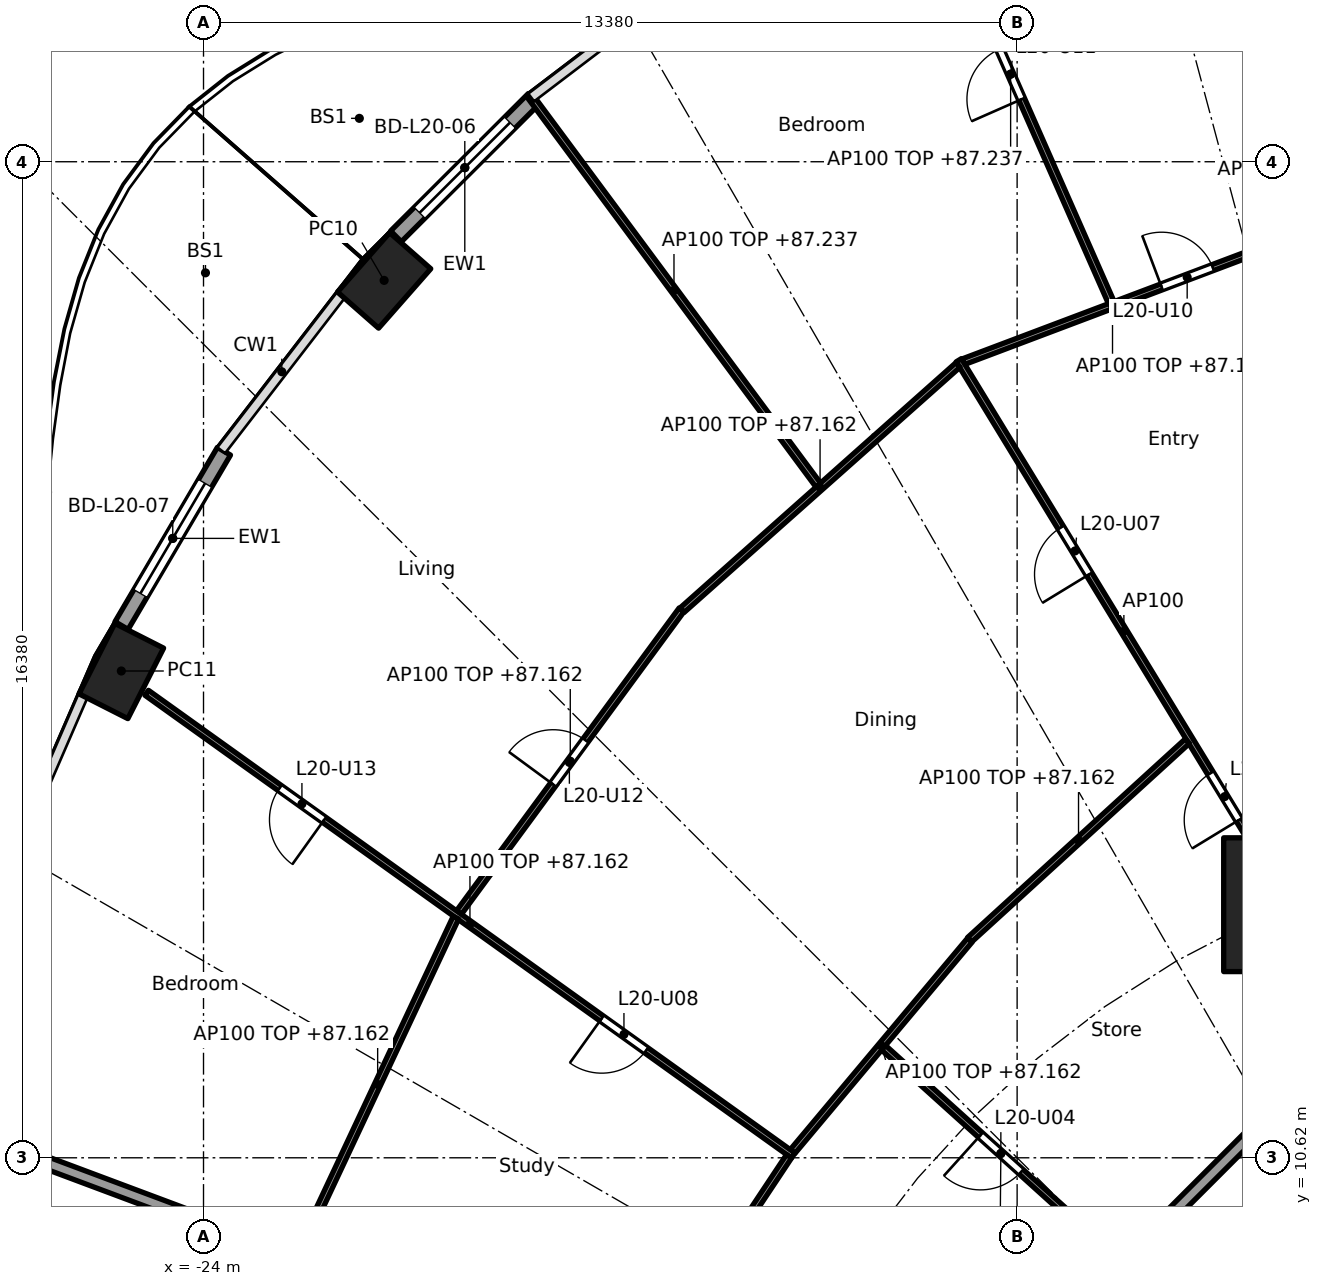
"""IFC4 building model, lengths in metres.
Left out: names, types, materials, properties, quantities, classifications, styles, units other than length and angle.
Written with IfcOpenShell. Run it as: python <this file> out.ifc"""

import sys

from ifc_helpers import new_model, si_unit, direction, frame, frame_2d, origin, origin_2d, place, context, subcontext, project, spatial, rectangle, hollow_rectangle, extrude, element, fill, save


model = new_model("IFC4")
c1 = context("Model", 3, precision=1e-05, world=origin(), true_north=direction((0.0, 1.0)))
c2 = subcontext(c1, "Body", "Model", "MODEL_VIEW")
j1 = project(units=[si_unit("LENGTHUNIT", "METRE"), si_unit("PLANEANGLEUNIT", "RADIAN")], contexts=[c1])
p1 = place(None, origin())
s1 = spatial("IfcSite", under=j1, at=p1, CompositionType="ELEMENT")
p2 = place(p1, origin())
s2 = spatial("IfcBuilding", under=s1, at=p2, CompositionType="ELEMENT")
p3 = place(p2, frame((0.0, 0.0, 84.4)))
s3 = spatial("IfcBuildingStorey", under=s2, at=p3, CompositionType="ELEMENT", Elevation=84.4)
for number, where, z_axis, x_axis in (
    (1, (-21.03, 25.049, 0.0), (0.0, 0.0, 1.0), (-0.66, -0.751, 0.0)),
    (2, (-25.352, 18.625, 0.0), (0.0, 0.0, 1.0), (-0.452, -0.892, 0.0)),
):
    element("IfcColumn", number, at=place(p3, frame(where, z_axis=z_axis, x_axis=x_axis)), inside=s3, PredefinedType="COLUMN", context=c2, shape_type="SweptSolid", body=[
        extrude(hollow_rectangle(XDim=1.3, YDim=0.9, WallThickness=0.045, at=origin_2d()), origin(), (0.0, 0.0, 1.0), 3.7),
    ])
p4 = place(p3, frame((-6.123, 14.782, 0.0), z_axis=(0.0, 0.0, 1.0), x_axis=(1.0, 0.0, 0.0)))
e3 = element("IfcColumn", 3, at=p4, inside=s3, PredefinedType="COLUMN", context=c2, shape_type="SweptSolid", body=[
    extrude(rectangle(XDim=2.2, YDim=2.2, at=origin_2d()), origin(), (0.0, 0.0, 1.0), 3.7),
])
p5 = place(p3, frame((-20.835, 25.773, 0.0), z_axis=(0.0, 0.0, 1.0), x_axis=(0.707831646613, 0.706381171927, 0.0)))
e4 = element("IfcWall", 4, at=p5, inside=s3, PredefinedType="SOLIDWALL", context=c2, shape_type="SweptSolid", body=[
    extrude(rectangle(XDim=3.198, YDim=0.25, at=frame_2d((1.599, 0.0))), origin(), (0.0, 0.0, 1.0), 3.44),
])
p6 = place(p5, frame((0.549, 0.0, 0.0)))
e5 = element("IfcOpeningElement", 5, at=p6, cuts=e4, PredefinedType="OPENING", context=c2, shape_type="SweptSolid", body=[
    extrude(rectangle(XDim=2.1, YDim=2.4, at=frame_2d((1.05, 1.2))), frame((0.0, 0.135, 0.0), z_axis=(0.0, -1.0, 0.0), x_axis=(1.0, 0.0, 0.0)), (0.0, 0.0, 1.0), 0.27),
])
p7 = place(p3, frame((-25.348, 19.372, 0.0), z_axis=(0.0, 0.0, 1.0), x_axis=(0.506352525095, 0.86232657406, 0.0)))
e6 = element("IfcWall", 6, at=p7, inside=s3, PredefinedType="SOLIDWALL", context=c2, shape_type="SweptSolid", body=[
    extrude(rectangle(XDim=3.325, YDim=0.25, at=frame_2d((1.663, 0.0))), origin(), (0.0, 0.0, 1.0), 3.44),
])
p8 = place(p7, frame((0.612, 0.0, 0.0)))
e7 = element("IfcOpeningElement", 7, at=p8, cuts=e6, PredefinedType="OPENING", context=c2, shape_type="SweptSolid", body=[
    extrude(rectangle(XDim=2.1, YDim=2.4, at=frame_2d((1.05, 1.2))), frame((0.0, 0.135, 0.0), z_axis=(0.0, -1.0, 0.0), x_axis=(1.0, 0.0, 0.0)), (0.0, 0.0, 1.0), 0.27),
])
p9 = place(p3, frame((-4.613, 9.988, 0.0), z_axis=(0.0, 0.0, 1.0), x_axis=(-0.707106781187, -0.707106781187, 0.0)))
e8 = element("IfcWall", 8, at=p9, inside=s3, PredefinedType="SHEAR", context=c2, shape_type="SweptSolid", body=[
    extrude(rectangle(XDim=7.602, YDim=0.6, at=frame_2d((3.801, 0.0))), origin(), (0.0, 0.0, 1.0), 3.44),
])
p10 = place(p9, frame((0.351, 0.0, 0.0)))
e9 = element("IfcOpeningElement", 9, at=p10, cuts=e8, PredefinedType="OPENING", context=c2, shape_type="SweptSolid", body=[
    extrude(rectangle(XDim=1.1, YDim=2.1, at=frame_2d((0.55, 1.05))), frame((0.0, 0.31, 0.0), z_axis=(0.0, -1.0, 0.0), x_axis=(1.0, 0.0, 0.0)), (0.0, 0.0, 1.0), 0.62),
])
p11 = place(p3, frame((-14.829, 6.14, 0.0), z_axis=(0.0, 0.0, 1.0), x_axis=(-0.936597324342, 0.35040755134, 0.0)))
e10 = element("IfcWall", 10, at=p11, inside=s3, PredefinedType="PARTITIONING", context=c2, shape_type="SweptSolid", body=[
    extrude(rectangle(XDim=13.606, YDim=0.2, at=frame_2d((6.803, 0.0))), origin(), (0.0, 0.0, 1.0), 2.762),
])
p12 = place(p3, frame((-5.275, 12.494, 0.0), z_axis=(0.0, 0.0, 1.0), x_axis=(-0.707106781187, -0.707106781187, 0.0)))
e11 = element("IfcWall", 11, at=p12, inside=s3, PredefinedType="PARTITIONING", context=c2, shape_type="SweptSolid", body=[
    extrude(rectangle(XDim=10.209, YDim=0.2, at=frame_2d((5.104, 0.0))), origin(), (0.0, 0.0, 1.0), 3.44),
])
p13 = place(p3, frame((-6.596, 25.563, 0.0), z_axis=(0.0, 0.0, 1.0), x_axis=(-0.9356162121, -0.353018843201, 0.0)))
e12 = element("IfcWall", 12, at=p13, inside=s3, PredefinedType="PARTITIONING", context=c2, shape_type="SweptSolid", body=[
    extrude(rectangle(XDim=5.249, YDim=0.1, at=frame_2d((2.625, 0.0))), origin(), (0.0, 0.0, 1.0), 2.762),
])
p14 = place(p13, frame((0.862, 0.0, 0.0)))
e13 = element("IfcOpeningElement", 13, at=p14, cuts=e12, PredefinedType="OPENING", context=c2, shape_type="SweptSolid", body=[
    extrude(rectangle(XDim=0.9, YDim=2.1, at=frame_2d((0.45, 1.05))), frame((0.0, 0.06, 0.0), z_axis=(0.0, -1.0, 0.0), x_axis=(1.0, 0.0, 0.0)), (0.0, 0.0, 1.0), 0.12),
])
p15 = place(p3, frame((-9.072, 24.683, 0.0), z_axis=(0.0, 0.0, 1.0), x_axis=(-0.403192911159, 0.915115007194, 0.0)))
e14 = element("IfcWall", 14, at=p15, inside=s3, PredefinedType="PARTITIONING", context=c2, shape_type="SweptSolid", body=[
    extrude(rectangle(XDim=8.211, YDim=0.1, at=frame_2d((4.106, 0.0))), origin(), (0.0, 0.0, 1.0), 2.837),
])
p16 = place(p15, frame((3.656, 0.0, 0.0)))
e15 = element("IfcOpeningElement", 15, at=p16, cuts=e14, PredefinedType="OPENING", context=c2, shape_type="SweptSolid", body=[
    extrude(rectangle(XDim=0.9, YDim=2.1, at=frame_2d((0.45, 1.05))), frame((0.0, 0.06, 0.0), z_axis=(0.0, -1.0, 0.0), x_axis=(1.0, 0.0, 0.0)), (0.0, 0.0, 1.0), 0.12),
])
p17 = place(p3, frame((-6.149, 14.825, 0.0), z_axis=(0.0, 0.0, 1.0), x_axis=(-0.520411490252, 0.853915616917, 0.0)))
e16 = element("IfcWall", 16, at=p17, inside=s3, PredefinedType="PARTITIONING", context=c2, shape_type="SweptSolid", body=[
    extrude(rectangle(XDim=10.435, YDim=0.1, at=frame_2d((5.218, 0.0))), origin(), (0.0, 0.0, 1.0), 3.44),
])
p18 = place(p17, frame((1.582, 0.0, 0.0)))
e17 = element("IfcOpeningElement", 17, at=p18, cuts=e16, PredefinedType="OPENING", context=c2, shape_type="SweptSolid", body=[
    extrude(rectangle(XDim=0.9, YDim=2.1, at=frame_2d((0.45, 1.05))), frame((0.0, 0.06, 0.0), z_axis=(0.0, -1.0, 0.0), x_axis=(1.0, 0.0, 0.0)), (0.0, 0.0, 1.0), 0.12),
])
p19 = place(p17, frame((6.312, 0.0, 0.0)))
e18 = element("IfcOpeningElement", 18, at=p19, cuts=e16, PredefinedType="OPENING", context=c2, shape_type="SweptSolid", body=[
    extrude(rectangle(XDim=0.9, YDim=2.1, at=frame_2d((0.45, 1.05))), frame((0.0, 0.06, 0.0), z_axis=(0.0, -1.0, 0.0), x_axis=(1.0, 0.0, 0.0)), (0.0, 0.0, 1.0), 0.12),
])
p20 = place(p3, frame((-7.82, 17.472, 0.0), z_axis=(0.0, 0.0, 1.0), x_axis=(-0.73885182489, -0.67386792538, 0.0)))
e19 = element("IfcWall", 19, at=p20, inside=s3, PredefinedType="PARTITIONING", context=c2, shape_type="SweptSolid", body=[
    extrude(rectangle(XDim=4.846, YDim=0.1, at=frame_2d((2.423, 0.0))), origin(), (0.0, 0.0, 1.0), 2.762),
])
p21 = place(p3, frame((-11.591, 23.66, 0.0), z_axis=(0.0, 0.0, 1.0), x_axis=(-0.747429278403, -0.664341383466, 0.0)))
e20 = element("IfcWall", 20, at=p21, inside=s3, PredefinedType="PARTITIONING", context=c2, shape_type="SweptSolid", body=[
    extrude(rectangle(XDim=6.073, YDim=0.1, at=frame_2d((3.037, 0.0))), origin(), (0.0, 0.0, 1.0), 2.762),
])
p22 = place(p3, frame((-13.89, 21.682, 0.0), z_axis=(0.0, 0.0, 1.0), x_axis=(-0.595256113594, 0.803536034804, 0.0)))
e21 = element("IfcWall", 21, at=p22, inside=s3, PredefinedType="PARTITIONING", context=c2, shape_type="SweptSolid", body=[
    extrude(rectangle(XDim=7.972, YDim=0.1, at=frame_2d((3.986, 0.0))), origin(), (0.0, 0.0, 1.0), 2.837),
])
p23 = place(p3, frame((-11.396, 14.202, 0.0), z_axis=(0.0, 0.0, 1.0), x_axis=(-0.642483859922, -0.766299216847, 0.0)))
e22 = element("IfcWall", 22, at=p23, inside=s3, PredefinedType="PARTITIONING", context=c2, shape_type="SweptSolid", body=[
    extrude(rectangle(XDim=4.537, YDim=0.1, at=frame_2d((2.269, 0.0))), origin(), (0.0, 0.0, 1.0), 2.762),
])
p24 = place(p3, frame((-16.138, 19.632, 0.0), z_axis=(0.0, 0.0, 1.0), x_axis=(-0.592401008469, -0.805643249314, 0.0)))
e23 = element("IfcWall", 23, at=p24, inside=s3, PredefinedType="PARTITIONING", context=c2, shape_type="SweptSolid", body=[
    extrude(rectangle(XDim=6.18, YDim=0.1, at=frame_2d((3.09, 0.0))), origin(), (0.0, 0.0, 1.0), 2.762),
])
p25 = place(p24, frame((2.665, 0.0, 0.0)))
e24 = element("IfcOpeningElement", 24, at=p25, cuts=e23, PredefinedType="OPENING", context=c2, shape_type="SweptSolid", body=[
    extrude(rectangle(XDim=0.9, YDim=2.1, at=frame_2d((0.45, 1.05))), frame((0.0, 0.06, 0.0), z_axis=(0.0, -1.0, 0.0), x_axis=(1.0, 0.0, 0.0)), (0.0, 0.0, 1.0), 0.12),
])
p26 = place(p3, frame((-8.959, 8.952, 0.0), z_axis=(0.0, 0.0, 1.0), x_axis=(-0.742686144764, 0.669639672045, 0.0)))
e25 = element("IfcWall", 25, at=p26, inside=s3, PredefinedType="PARTITIONING", context=c2, shape_type="SweptSolid", body=[
    extrude(rectangle(XDim=5.194, YDim=0.1, at=frame_2d((2.597, 0.0))), origin(), (0.0, 0.0, 1.0), 2.687),
])
p27 = place(p26, frame((2.147, 0.0, 0.0)))
e26 = element("IfcOpeningElement", 26, at=p27, cuts=e25, PredefinedType="OPENING", context=c2, shape_type="SweptSolid", body=[
    extrude(rectangle(XDim=0.9, YDim=2.1, at=frame_2d((0.45, 1.05))), frame((0.0, 0.06, 0.0), z_axis=(0.0, -1.0, 0.0), x_axis=(1.0, 0.0, 0.0)), (0.0, 0.0, 1.0), 0.12),
])
p28 = place(p3, frame((-14.302, 10.657, 0.0), z_axis=(0.0, 0.0, 1.0), x_axis=(-0.813183002698, 0.582008079087, 0.0)))
e27 = element("IfcWall", 27, at=p28, inside=s3, PredefinedType="PARTITIONING", context=c2, shape_type="SweptSolid", body=[
    extrude(rectangle(XDim=13.074, YDim=0.1, at=frame_2d((6.537, 0.0))), origin(), (0.0, 0.0, 1.0), 2.762),
])
p29 = place(p28, frame((2.973, 0.0, 0.0)))
e28 = element("IfcOpeningElement", 28, at=p29, cuts=e27, PredefinedType="OPENING", context=c2, shape_type="SweptSolid", body=[
    extrude(rectangle(XDim=0.9, YDim=2.1, at=frame_2d((0.45, 1.05))), frame((0.0, 0.06, 0.0), z_axis=(0.0, -1.0, 0.0), x_axis=(1.0, 0.0, 0.0)), (0.0, 0.0, 1.0), 0.12),
])
p30 = place(p28, frame((9.485, 0.0, 0.0)))
e29 = element("IfcOpeningElement", 29, at=p30, cuts=e27, PredefinedType="OPENING", context=c2, shape_type="SweptSolid", body=[
    extrude(rectangle(XDim=0.9, YDim=2.1, at=frame_2d((0.45, 1.05))), frame((0.0, 0.06, 0.0), z_axis=(0.0, -1.0, 0.0), x_axis=(1.0, 0.0, 0.0)), (0.0, 0.0, 1.0), 0.12),
])
p31 = place(p3, frame((-14.371, 10.645, 0.0), z_axis=(0.0, 0.0, 1.0), x_axis=(-0.553341009285, -0.832954817168, 0.0)))
e30 = element("IfcWall", 30, at=p31, inside=s3, PredefinedType="PARTITIONING", context=c2, shape_type="SweptSolid", body=[
    extrude(rectangle(XDim=4.396, YDim=0.1, at=frame_2d((2.198, 0.0))), origin(), (0.0, 0.0, 1.0), 2.762),
])
p32 = place(p3, frame((-19.85, 14.567, 0.0), z_axis=(0.0, 0.0, 1.0), x_axis=(-0.424942210745, -0.905220480064, 0.0)))
e31 = element("IfcWall", 31, at=p32, inside=s3, PredefinedType="PARTITIONING", context=c2, shape_type="SweptSolid", body=[
    extrude(rectangle(XDim=6.053, YDim=0.1, at=frame_2d((3.027, 0.0))), origin(), (0.0, 0.0, 1.0), 2.762),
])
p33 = place(p6, origin())
e32 = element("IfcDoor", 32, at=p33, inside=s3, OperationType="SLIDING_TO_LEFT", PredefinedType="DOOR", context=c2, shape_type="SweptSolid", body=[
    extrude(rectangle(XDim=2.1, YDim=2.4, at=frame_2d((1.05, 1.2))), frame((0.0, 0.025, 0.0), z_axis=(0.0, -1.0, 0.0), x_axis=(1.0, 0.0, 0.0)), (0.0, 0.0, 1.0), 0.05),
])
fill(e5, e32)
p34 = place(p8, origin())
e33 = element("IfcDoor", 33, at=p34, inside=s3, OperationType="SLIDING_TO_LEFT", PredefinedType="DOOR", context=c2, shape_type="SweptSolid", body=[
    extrude(rectangle(XDim=2.1, YDim=2.4, at=frame_2d((1.05, 1.2))), frame((0.0, 0.025, 0.0), z_axis=(0.0, -1.0, 0.0), x_axis=(1.0, 0.0, 0.0)), (0.0, 0.0, 1.0), 0.05),
])
fill(e7, e33)
p35 = place(p18, origin())
e34 = element("IfcDoor", 34, at=p35, inside=s3, OperationType="SINGLE_SWING_LEFT", PredefinedType="DOOR", context=c2, shape_type="SweptSolid", body=[
    extrude(rectangle(XDim=0.9, YDim=2.1, at=frame_2d((0.45, 1.05))), frame((0.0, 0.025, 0.0), z_axis=(0.0, -1.0, 0.0), x_axis=(1.0, 0.0, 0.0)), (0.0, 0.0, 1.0), 0.05),
])
fill(e17, e34)
p36 = place(p27, origin())
e35 = element("IfcDoor", 35, at=p36, inside=s3, OperationType="SINGLE_SWING_RIGHT", PredefinedType="DOOR", context=c2, shape_type="SweptSolid", body=[
    extrude(rectangle(XDim=0.9, YDim=2.1, at=frame_2d((0.45, 1.05))), frame((0.0, 0.025, 0.0), z_axis=(0.0, -1.0, 0.0), x_axis=(1.0, 0.0, 0.0)), (0.0, 0.0, 1.0), 0.05),
])
fill(e26, e35)
p37 = place(p19, origin())
e36 = element("IfcDoor", 36, at=p37, inside=s3, OperationType="SINGLE_SWING_LEFT", PredefinedType="DOOR", context=c2, shape_type="SweptSolid", body=[
    extrude(rectangle(XDim=0.9, YDim=2.1, at=frame_2d((0.45, 1.05))), frame((0.0, 0.025, 0.0), z_axis=(0.0, -1.0, 0.0), x_axis=(1.0, 0.0, 0.0)), (0.0, 0.0, 1.0), 0.05),
])
fill(e18, e36)
p38 = place(p29, origin())
e37 = element("IfcDoor", 37, at=p38, inside=s3, OperationType="SINGLE_SWING_RIGHT", PredefinedType="DOOR", context=c2, shape_type="SweptSolid", body=[
    extrude(rectangle(XDim=0.9, YDim=2.1, at=frame_2d((0.45, 1.05))), frame((0.0, 0.025, 0.0), z_axis=(0.0, -1.0, 0.0), x_axis=(1.0, 0.0, 0.0)), (0.0, 0.0, 1.0), 0.05),
])
fill(e28, e37)
p39 = place(p14, frame((0.9, 0.0, 0.0), x_axis=(-1.0, 0.0, 0.0)))
e38 = element("IfcDoor", 38, at=p39, inside=s3, OperationType="SINGLE_SWING_LEFT", PredefinedType="DOOR", context=c2, shape_type="SweptSolid", body=[
    extrude(rectangle(XDim=0.9, YDim=2.1, at=frame_2d((0.45, 1.05))), frame((0.0, 0.025, 0.0), z_axis=(0.0, -1.0, 0.0), x_axis=(1.0, 0.0, 0.0)), (0.0, 0.0, 1.0), 0.05),
])
fill(e13, e38)
p40 = place(p16, origin())
e39 = element("IfcDoor", 39, at=p40, inside=s3, OperationType="SINGLE_SWING_LEFT", PredefinedType="DOOR", context=c2, shape_type="SweptSolid", body=[
    extrude(rectangle(XDim=0.9, YDim=2.1, at=frame_2d((0.45, 1.05))), frame((0.0, 0.025, 0.0), z_axis=(0.0, -1.0, 0.0), x_axis=(1.0, 0.0, 0.0)), (0.0, 0.0, 1.0), 0.05),
])
fill(e15, e39)
p41 = place(p25, frame((0.9, 0.0, 0.0), x_axis=(-1.0, 0.0, 0.0)))
e40 = element("IfcDoor", 40, at=p41, inside=s3, OperationType="SINGLE_SWING_LEFT", PredefinedType="DOOR", context=c2, shape_type="SweptSolid", body=[
    extrude(rectangle(XDim=0.9, YDim=2.1, at=frame_2d((0.45, 1.05))), frame((0.0, 0.025, 0.0), z_axis=(0.0, -1.0, 0.0), x_axis=(1.0, 0.0, 0.0)), (0.0, 0.0, 1.0), 0.05),
])
fill(e24, e40)
p42 = place(p30, origin())
e41 = element("IfcDoor", 41, at=p42, inside=s3, OperationType="SINGLE_SWING_LEFT", PredefinedType="DOOR", context=c2, shape_type="SweptSolid", body=[
    extrude(rectangle(XDim=0.9, YDim=2.1, at=frame_2d((0.45, 1.05))), frame((0.0, 0.025, 0.0), z_axis=(0.0, -1.0, 0.0), x_axis=(1.0, 0.0, 0.0)), (0.0, 0.0, 1.0), 0.05),
])
fill(e29, e41)
save(model, sys.argv[1])
